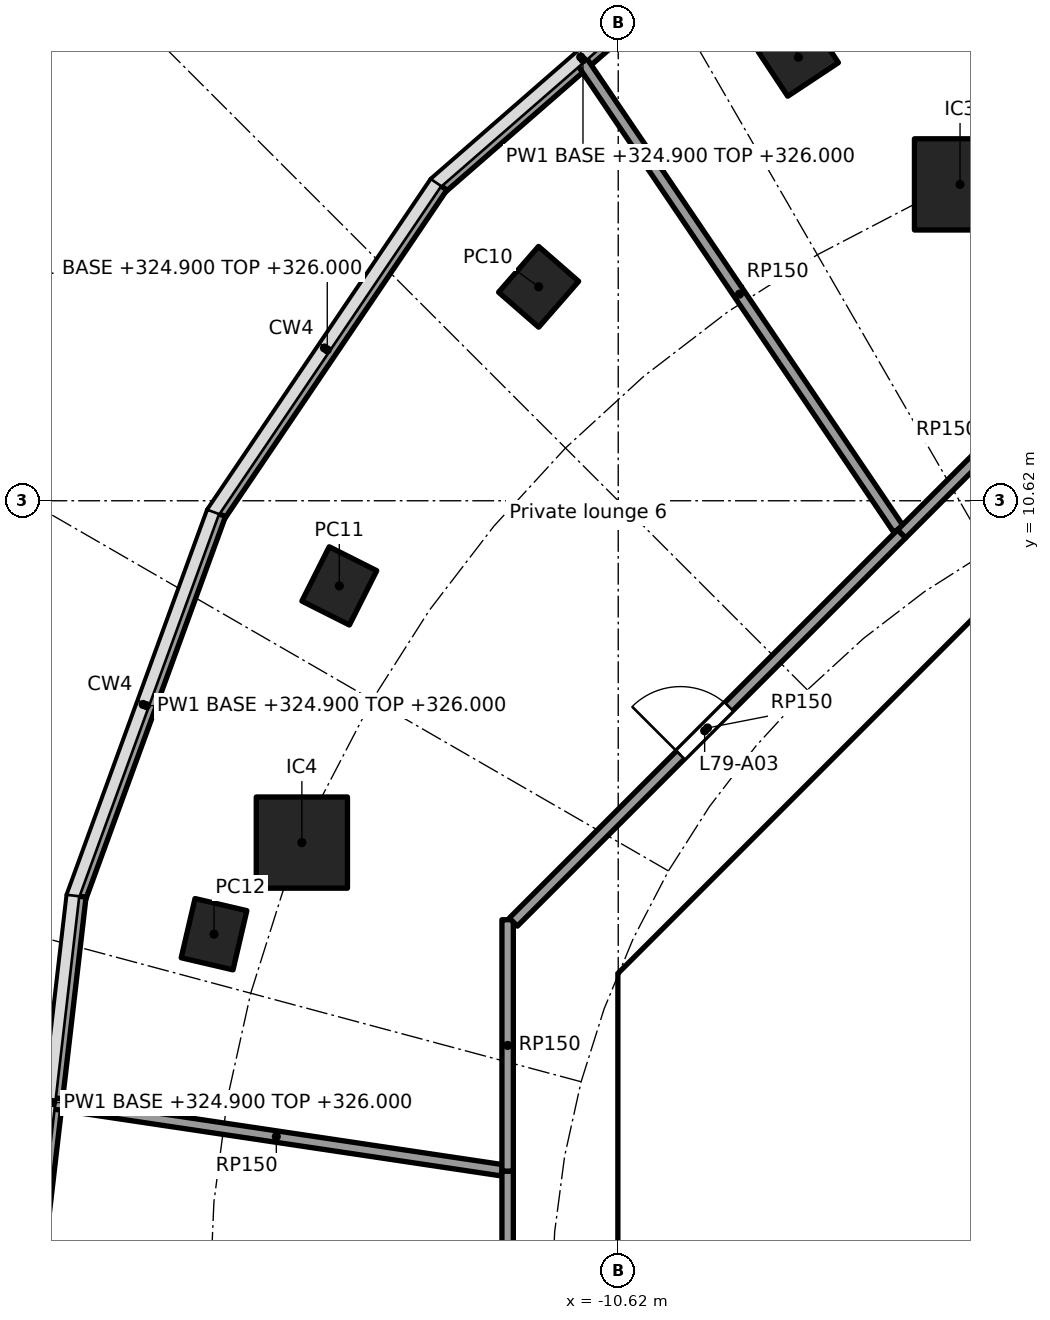
"""IFC4 building model, lengths in metres.
Left out: names, types, materials, properties, quantities, classifications, styles, units other than length and angle.
Written with IfcOpenShell. Run it as: python <this file> out.ifc"""

import sys

from ifc_helpers import new_model, si_unit, direction, frame, frame_2d, origin, origin_2d, place, context, subcontext, project, spatial, polyline, rectangle, hollow_rectangle, outline, extrude, element, fill, save


model = new_model("IFC4")
c1 = context("Model", 3, precision=1e-05, world=origin(), true_north=direction((0.0, 1.0)))
c2 = subcontext(c1, "Body", "Model", "MODEL_VIEW")
j1 = project(units=[si_unit("LENGTHUNIT", "METRE"), si_unit("PLANEANGLEUNIT", "RADIAN")], contexts=[c1])
p1 = place(None, origin())
s1 = spatial("IfcSite", under=j1, at=p1, CompositionType="ELEMENT")
p2 = place(p1, origin())
s2 = spatial("IfcBuilding", under=s1, at=p2, CompositionType="ELEMENT")
p3 = place(p2, frame((0.0, 0.0, 320.4)))
s3 = spatial("IfcBuildingStorey", under=s2, at=p3, CompositionType="ELEMENT", Elevation=320.4)
for number, where, z_axis, x_axis in (
    (1, (-8.25, 16.455, 0.0), (0.0, 0.0, 1.0), (-0.834, -0.552, 0.0)),
    (2, (-11.667, 13.435, 0.0), (0.0, 0.0, 1.0), (-0.657, -0.754, 0.0)),
    (3, (-14.289, 9.5, 0.0), (0.0, 0.0, 1.0), (-0.45, -0.893, 0.0)),
    (4, (-15.938, 4.917, 0.0), (0.0, 0.0, 1.0), (-0.227, -0.974, 0.0)),
):
    element("IfcColumn", number, at=place(p3, frame(where, z_axis=z_axis, x_axis=x_axis)), inside=s3, PredefinedType="COLUMN", context=c2, shape_type="SweptSolid", body=[
        extrude(hollow_rectangle(XDim=0.8, YDim=0.7, WallThickness=0.025, at=origin_2d()), origin(), (0.0, 0.0, 1.0), 4.5),
    ])
for number, where, z_axis, x_axis in (
    (5, (-6.123, 14.782, 0.0), (0.0, 0.0, 1.0), (1.0, 0.0, 0.0)),
    (6, (-14.782, 6.123, 0.0), (0.0, 0.0, 1.0), (1.0, 0.0, 0.0)),
):
    element("IfcColumn", number, at=place(p3, frame(where, z_axis=z_axis, x_axis=x_axis)), inside=s3, PredefinedType="COLUMN", context=c2, shape_type="SweptSolid", body=[
        extrude(rectangle(XDim=1.2, YDim=1.2, at=origin_2d()), origin(), (0.0, 0.0, 1.0), 4.5),
    ])
p4 = place(p3, frame((-9.168, 18.092, 4.5), z_axis=(0.0, 0.0, 1.0), x_axis=(-0.754036302734, -0.656832744432, 0.0)))
e7 = element("IfcWall", 7, at=p4, inside=s3, PredefinedType="PARAPET", context=c2, shape_type="SweptSolid", body=[
    extrude(rectangle(XDim=5.081, YDim=0.25, at=frame_2d((2.541, 0.0))), origin(), (0.0, 0.0, 1.0), 1.1),
])
p5 = place(p3, frame((-12.978, 14.779, 4.5), z_axis=(0.0, 0.0, 1.0), x_axis=(-0.560011865881, -0.828484586503, 0.0)))
e8 = element("IfcWall", 8, at=p5, inside=s3, PredefinedType="PARAPET", context=c2, shape_type="SweptSolid", body=[
    extrude(rectangle(XDim=5.25, YDim=0.25, at=frame_2d((2.625, 0.0))), origin(), (0.0, 0.0, 1.0), 1.1),
])
p6 = place(p3, frame((-15.904, 10.457, 4.5), z_axis=(0.0, 0.0, 1.0), x_axis=(-0.342797263009, -0.939409408338, 0.0)))
e9 = element("IfcWall", 9, at=p6, inside=s3, PredefinedType="PARAPET", context=c2, shape_type="SweptSolid", body=[
    extrude(rectangle(XDim=5.391, YDim=0.25, at=frame_2d((2.696, 0.0))), origin(), (0.0, 0.0, 1.0), 1.1),
])
p7 = place(p3, frame((-17.745, 5.421, 4.5), z_axis=(0.0, 0.0, 1.0), x_axis=(-0.115204975707, -0.993341740577, 0.0)))
e10 = element("IfcWall", 10, at=p7, inside=s3, PredefinedType="PARAPET", context=c2, shape_type="SweptSolid", body=[
    extrude(rectangle(XDim=5.472, YDim=0.25, at=frame_2d((2.736, 0.0))), origin(), (0.0, 0.0, 1.0), 1.1),
])
p8 = place(p3, frame((-4.613, 9.988, 0.0), z_axis=(0.0, 0.0, 1.0), x_axis=(-0.707106781187, -0.707106781187, 0.0)))
e11 = element("IfcWall", 11, at=p8, inside=s3, PredefinedType="SHEAR", context=c2, shape_type="SweptSolid", body=[
    extrude(rectangle(XDim=7.602, YDim=0.6, at=frame_2d((3.801, 0.0))), origin(), (0.0, 0.0, 1.0), 4.2),
])
p9 = place(p8, frame((0.351, 0.0, 0.0)))
e12 = element("IfcOpeningElement", 12, at=p9, cuts=e11, PredefinedType="OPENING", context=c2, shape_type="SweptSolid", body=[
    extrude(rectangle(XDim=1.1, YDim=2.1, at=frame_2d((0.55, 1.05))), frame((0.0, 0.31, 0.0), z_axis=(0.0, -1.0, 0.0), x_axis=(1.0, 0.0, 0.0)), (0.0, 0.0, 1.0), 0.62),
])
p10 = place(p3, frame((-10.325, 3.801, 0.0), z_axis=(0.0, 0.0, 1.0), x_axis=(0.0, -1.0, 0.0)))
e13 = element("IfcWall", 13, at=p10, inside=s3, PredefinedType="SHEAR", context=c2, shape_type="SweptSolid", body=[
    extrude(rectangle(XDim=7.602, YDim=0.6, at=frame_2d((3.801, 0.0))), origin(), (0.0, 0.0, 1.0), 4.2),
])
p11 = place(p10, frame((0.651, 0.0, 0.0)))
e14 = element("IfcOpeningElement", 14, at=p11, cuts=e13, PredefinedType="OPENING", context=c2, shape_type="SweptSolid", body=[
    extrude(rectangle(XDim=1.5, YDim=2.1, at=frame_2d((0.75, 1.05))), frame((0.0, 0.31, 0.0), z_axis=(0.0, -1.0, 0.0), x_axis=(1.0, 0.0, 0.0)), (0.0, 0.0, 1.0), 0.62),
])
p12 = place(p10, frame((5.451, 0.0, 0.0)))
e15 = element("IfcOpeningElement", 15, at=p12, cuts=e13, PredefinedType="OPENING", context=c2, shape_type="SweptSolid", body=[
    extrude(rectangle(XDim=1.5, YDim=2.1, at=frame_2d((0.75, 1.05))), frame((0.0, 0.31, 0.0), z_axis=(0.0, -1.0, 0.0), x_axis=(1.0, 0.0, 0.0)), (0.0, 0.0, 1.0), 0.62),
])
p13 = place(p3, frame((-6.7, 2.0, 0.0), z_axis=(0.0, 0.0, 1.0), x_axis=(1.0, 0.0, 0.0)))
e16 = element("IfcWall", 16, at=p13, inside=s3, PredefinedType="SOLIDWALL", context=c2, shape_type="SweptSolid", body=[
    extrude(rectangle(XDim=13.4, YDim=0.2, at=frame_2d((6.7, 0.0))), origin(), (0.0, 0.0, 1.0), 4.2),
])
p14 = place(p13, frame((11.65, 0.0, 0.0)))
e17 = element("IfcOpeningElement", 17, at=p14, cuts=e16, PredefinedType="OPENING", context=c2, shape_type="SweptSolid", body=[
    extrude(rectangle(XDim=1.1, YDim=2.1, at=frame_2d((0.55, 1.05))), frame((0.0, 0.11, 0.0), z_axis=(0.0, -1.0, 0.0), x_axis=(1.0, 0.0, 0.0)), (0.0, 0.0, 1.0), 0.22),
])
p15 = place(p13, frame((1.85, 0.0, 0.0)))
e18 = element("IfcOpeningElement", 18, at=p15, cuts=e16, PredefinedType="OPENING", context=c2, shape_type="SweptSolid", body=[
    extrude(rectangle(XDim=0.9, YDim=2.1, at=frame_2d((0.45, 1.05))), frame((0.0, 0.11, 0.0), z_axis=(0.0, -1.0, 0.0), x_axis=(1.0, 0.0, 0.0)), (0.0, 0.0, 1.0), 0.22),
])
p16 = place(p13, frame((5.15, 0.0, 0.0)))
e19 = element("IfcOpeningElement", 19, at=p16, cuts=e16, PredefinedType="OPENING", context=c2, shape_type="SweptSolid", body=[
    extrude(rectangle(XDim=0.9, YDim=2.1, at=frame_2d((0.45, 1.05))), frame((0.0, 0.11, 0.0), z_axis=(0.0, -1.0, 0.0), x_axis=(1.0, 0.0, 0.0)), (0.0, 0.0, 1.0), 0.22),
])
p17 = place(p13, frame((8.45, 0.0, 0.0)))
e20 = element("IfcOpeningElement", 20, at=p17, cuts=e16, PredefinedType="OPENING", context=c2, shape_type="SweptSolid", body=[
    extrude(rectangle(XDim=0.9, YDim=2.1, at=frame_2d((0.45, 1.05))), frame((0.0, 0.11, 0.0), z_axis=(0.0, -1.0, 0.0), x_axis=(1.0, 0.0, 0.0)), (0.0, 0.0, 1.0), 0.22),
])
p18 = place(p3, origin())
e21 = element("IfcWall", 21, at=p18, inside=s3, PredefinedType="SHEAR", context=c2, shape_type="SweptSolid", body=[
    extrude(outline(polyline([(-10.2, 4.825), (-9.776, 4.401), (-10.025, 4.152), (-10.025, 3.801), (-10.625, 3.801), (-10.625, 4.401), (-10.2, 4.825)])), origin(), (0.0, 0.0, 1.0), 4.2),
])
p19 = place(p3, frame((-10.025, 4.0, 0.0), z_axis=(0.0, 0.0, 1.0), x_axis=(1.0, 0.0, 0.0)))
e22 = element("IfcWall", 22, at=p19, inside=s3, PredefinedType="PARTITIONING", context=c2, shape_type="SweptSolid", body=[
    extrude(rectangle(XDim=3.325, YDim=0.2, at=frame_2d((1.662, 0.0))), origin(), (0.0, 0.0, 1.0), 4.2),
])
p20 = place(p3, frame((-8.301, 5.8, 0.0), z_axis=(0.0, 0.0, 1.0), x_axis=(1.0, 0.0, 0.0)))
e23 = element("IfcWall", 23, at=p20, inside=s3, PredefinedType="PARTITIONING", context=c2, shape_type="SweptSolid", body=[
    extrude(rectangle(XDim=2.426, YDim=0.15, at=frame_2d((1.213, 0.0))), origin(), (0.0, 0.0, 1.0), 4.2),
])
p21 = place(p3, origin())
e24 = element("IfcWall", 24, at=p21, inside=s3, PredefinedType="SOLIDWALL", context=c2, shape_type="SweptSolid", body=[
    extrude(outline(polyline([(-6.7, 4.3), (6.7, 4.3), (6.7, 2.1), (6.5, 2.1), (6.5, 4.1), (4.5, 4.1), (4.5, 2.1), (4.3, 2.1), (4.3, 4.1), (0.1, 4.1), (0.1, 2.1), (-0.1, 2.1), (-0.1, 4.1), (-2.1, 4.1), (-2.1, 2.1), (-2.3, 2.1), (-2.3, 4.1), (-6.5, 4.1), (-6.5, 2.1), (-6.7, 2.1), (-6.7, 4.3)])), origin(), (0.0, 0.0, 1.0), 4.2),
])
p22 = place(p3, frame((-12.075, -5.107, 0.0), z_axis=(0.0, 0.0, 1.0), x_axis=(0.0, 1.0, 0.0)))
e25 = element("IfcWall", 25, at=p22, inside=s3, PredefinedType="PARTITIONING", context=c2, shape_type="SweptSolid", body=[
    extrude(rectangle(XDim=6.908, YDim=0.15, at=frame_2d((3.454, 0.0))), origin(), (0.0, 0.0, 1.0), 4.2),
])
p23 = place(p22, frame((3.057, 0.0, 0.0)))
e26 = element("IfcOpeningElement", 26, at=p23, cuts=e25, PredefinedType="OPENING", context=c2, shape_type="SweptSolid", body=[
    extrude(rectangle(XDim=0.9, YDim=2.1, at=frame_2d((0.45, 1.05))), frame((0.0, 0.085, 0.0), z_axis=(0.0, -1.0, 0.0), x_axis=(1.0, 0.0, 0.0)), (0.0, 0.0, 1.0), 0.17),
])
p24 = place(p3, frame((-12.15, 1.812, 0.0), z_axis=(0.0, 0.0, 1.0), x_axis=(-0.989039934914, 0.147648254801, 0.0)))
e27 = element("IfcWall", 27, at=p24, inside=s3, PredefinedType="PARTITIONING", context=c2, shape_type="SweptSolid", body=[
    extrude(rectangle(XDim=6.002, YDim=0.15, at=frame_2d((3.001, 0.0))), origin(), (0.0, 0.0, 1.0), 4.2),
])
p25 = place(p3, frame((-12.075, 1.801, 0.0), z_axis=(0.0, 0.0, 1.0), x_axis=(0.0, 1.0, 0.0)))
e28 = element("IfcWall", 28, at=p25, inside=s3, PredefinedType="PARTITIONING", context=c2, shape_type="SweptSolid", body=[
    extrude(rectangle(XDim=3.307, YDim=0.15, at=frame_2d((1.654, 0.0))), origin(), (0.0, 0.0, 1.0), 4.2),
])
p26 = place(p3, frame((-12.0, 5.077, 0.0), z_axis=(0.0, 0.0, 1.0), x_axis=(0.707157469239, 0.7070560895, 0.0)))
e29 = element("IfcWall", 29, at=p26, inside=s3, PredefinedType="PARTITIONING", context=c2, shape_type="SweptSolid", body=[
    extrude(rectangle(XDim=7.225, YDim=0.15, at=frame_2d((3.612, 0.0))), origin(), (0.0, 0.0, 1.0), 4.2),
])
p27 = place(p26, frame((3.109, 0.0, 0.0)))
e30 = element("IfcOpeningElement", 30, at=p27, cuts=e29, PredefinedType="OPENING", context=c2, shape_type="SweptSolid", body=[
    extrude(rectangle(XDim=0.9, YDim=2.1, at=frame_2d((0.45, 1.05))), frame((0.0, 0.085, 0.0), z_axis=(0.0, -1.0, 0.0), x_axis=(1.0, 0.0, 0.0)), (0.0, 0.0, 1.0), 0.17),
])
p28 = place(p3, frame((-6.934, 10.248, 0.0), z_axis=(0.0, 0.0, 1.0), x_axis=(-0.56046251301, 0.828179794194, 0.0)))
e31 = element("IfcWall", 31, at=p28, inside=s3, PredefinedType="PARTITIONING", context=c2, shape_type="SweptSolid", body=[
    extrude(rectangle(XDim=7.462, YDim=0.15, at=frame_2d((3.731, 0.0))), origin(), (0.0, 0.0, 1.0), 4.2),
])
p29 = place(p3, frame((-6.891, 10.185, 0.0), z_axis=(0.0, 0.0, 1.0), x_axis=(0.707150707683, 0.707062851961, 0.0)))
e32 = element("IfcWall", 32, at=p29, inside=s3, PredefinedType="PARTITIONING", context=c2, shape_type="SweptSolid", body=[
    extrude(rectangle(XDim=2.779, YDim=0.15, at=frame_2d((1.389, 0.0))), origin(), (0.0, 0.0, 1.0), 4.2),
])
p30 = place(p11, origin())
e33 = element("IfcDoor", 33, at=p30, inside=s3, OperationType="DOUBLE_DOOR_SINGLE_SWING", PredefinedType="DOOR", context=c2, shape_type="SweptSolid", body=[
    extrude(rectangle(XDim=1.5, YDim=2.1, at=frame_2d((0.75, 1.05))), frame((0.0, 0.025, 0.0), z_axis=(0.0, -1.0, 0.0), x_axis=(1.0, 0.0, 0.0)), (0.0, 0.0, 1.0), 0.05),
])
fill(e14, e33)
p31 = place(p27, origin())
e34 = element("IfcDoor", 34, at=p31, inside=s3, OperationType="SINGLE_SWING_LEFT", PredefinedType="DOOR", context=c2, shape_type="SweptSolid", body=[
    extrude(rectangle(XDim=0.9, YDim=2.1, at=frame_2d((0.45, 1.05))), frame((0.0, 0.025, 0.0), z_axis=(0.0, -1.0, 0.0), x_axis=(1.0, 0.0, 0.0)), (0.0, 0.0, 1.0), 0.05),
])
fill(e30, e34)
save(model, sys.argv[1])
